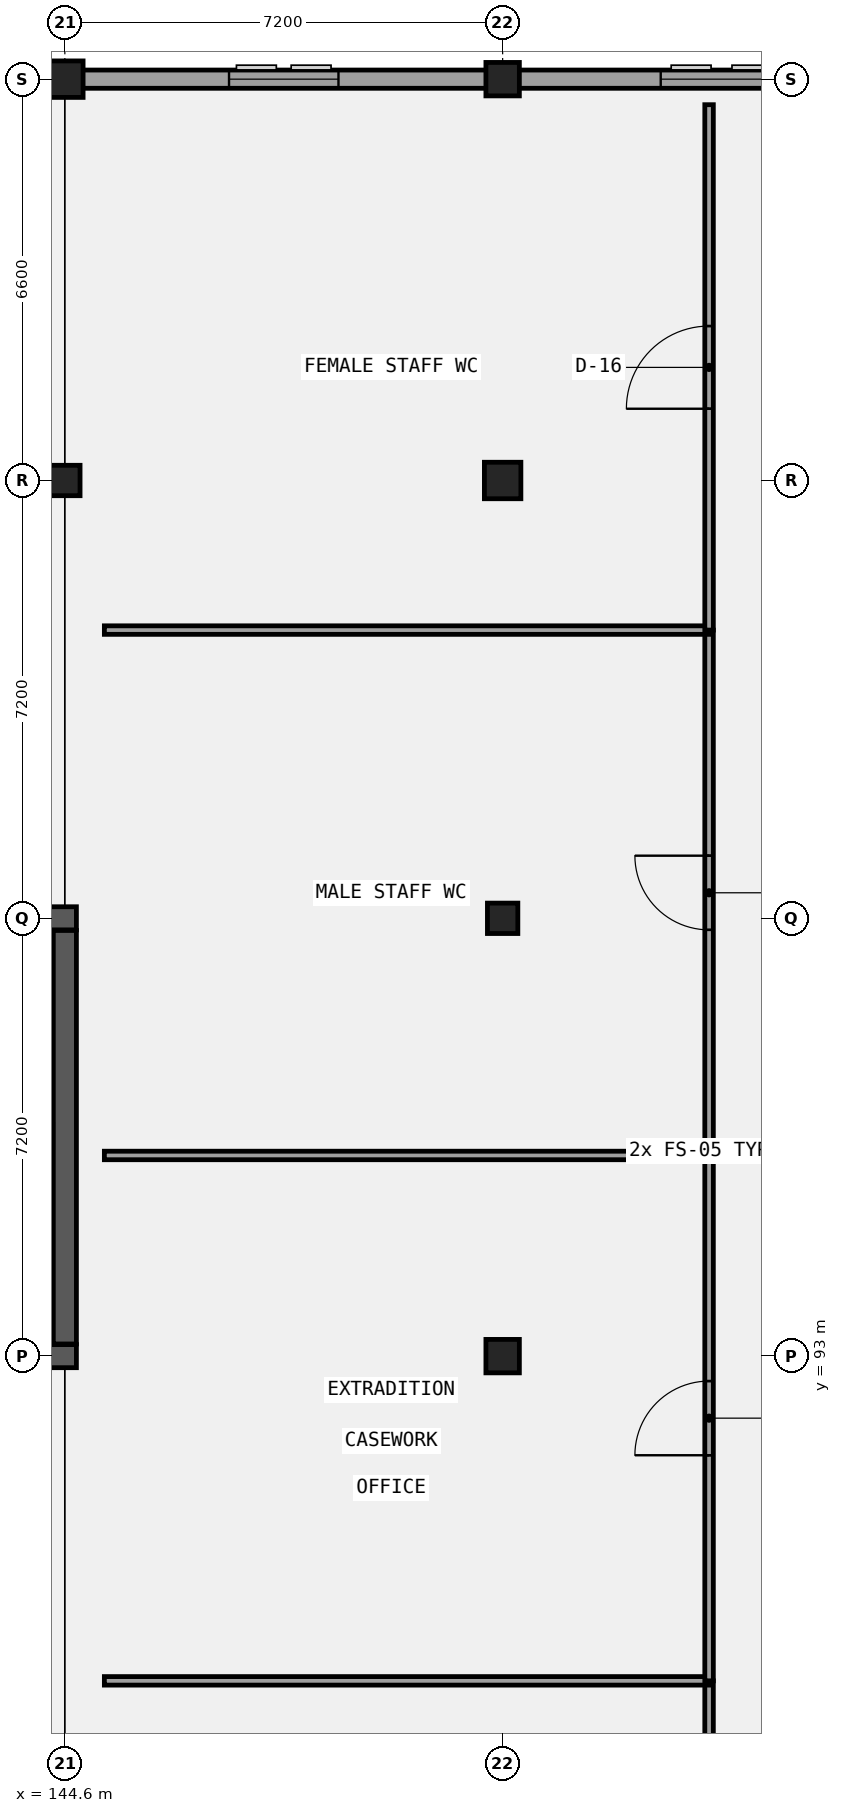
"""IFC4 building model, lengths in metres.
Left out: names, types, materials, properties, quantities, classifications, styles, units other than length and angle.
Written with IfcOpenShell. Run it as: python <this file> out.ifc"""

import sys

from ifc_helpers import new_model, si_unit, direction, frame, frame_2d, origin, origin_2d, place, context, subcontext, project, spatial, rectangle, extrude, element, fill, save


model = new_model("IFC4")
c1 = context("Model", 3, precision=1e-05, world=origin(), true_north=direction((0.0, 1.0)))
c2 = subcontext(c1, "Body", "Model", "MODEL_VIEW")
j1 = project(units=[si_unit("LENGTHUNIT", "METRE"), si_unit("PLANEANGLEUNIT", "RADIAN")], contexts=[c1])
p1 = place(None, origin())
s1 = spatial("IfcSite", under=j1, at=p1, CompositionType="ELEMENT")
p2 = place(p1, origin())
s2 = spatial("IfcBuilding", under=s1, at=p2, CompositionType="ELEMENT")
p3 = place(p2, frame((0.0, 0.0, 18.0)))
s3 = spatial("IfcBuildingStorey", under=s2, at=p3, CompositionType="ELEMENT", Elevation=18.0)
p4 = place(p3, frame((130.01, 100.2, 0.0), z_axis=(0.0, 0.0, 1.0), x_axis=(1.0, 0.0, 0.0)))
e1 = element("IfcWall", 1, at=p4, inside=s3, PredefinedType="SHEAR", context=c2, shape_type="SweptSolid", body=[
    extrude(rectangle(XDim=14.78, YDim=0.38, at=frame_2d((7.39, 0.0))), origin(), (0.0, 0.0, 1.0), 4.2),
])
p5 = place(p3, frame((130.01, 93.0, 0.0), z_axis=(0.0, 0.0, 1.0), x_axis=(1.0, 0.0, 0.0)))
e2 = element("IfcWall", 2, at=p5, inside=s3, PredefinedType="SHEAR", context=c2, shape_type="SweptSolid", body=[
    extrude(rectangle(XDim=14.78, YDim=0.38, at=frame_2d((7.39, 0.0))), origin(), (0.0, 0.0, 1.0), 4.2),
])
p6 = place(p5, frame((3.74, 0.0, 0.0)))
e3 = element("IfcOpeningElement", 3, at=p6, cuts=e2, PredefinedType="OPENING", context=c2, shape_type="SweptSolid", body=[
    extrude(rectangle(XDim=1.3, YDim=2.2, at=frame_2d((0.65, 1.1))), frame((0.0, 0.2, 0.0), z_axis=(0.0, -1.0, 0.0), x_axis=(1.0, 0.0, 0.0)), (0.0, 0.0, 1.0), 0.4),
])
p7 = place(p5, frame((11.74, 0.0, 0.0)))
e4 = element("IfcOpeningElement", 4, at=p7, cuts=e2, PredefinedType="OPENING", context=c2, shape_type="SweptSolid", body=[
    extrude(rectangle(XDim=1.3, YDim=2.2, at=frame_2d((0.65, 1.1))), frame((0.0, 0.2, 0.0), z_axis=(0.0, -1.0, 0.0), x_axis=(1.0, 0.0, 0.0)), (0.0, 0.0, 1.0), 0.4),
])
p8 = place(p3, frame((144.6, 93.2, 0.0), z_axis=(0.0, 0.0, 1.0), x_axis=(0.0, 1.0, 0.0)))
e5 = element("IfcWall", 5, at=p8, inside=s3, PredefinedType="SHEAR", context=c2, shape_type="SweptSolid", body=[
    extrude(rectangle(XDim=6.8, YDim=0.38, at=frame_2d((3.4, 0.0))), origin(), (0.0, 0.0, 1.0), 4.2),
])
p9 = place(p3, frame((130.4, 96.62, 0.0), z_axis=(0.0, 0.0, 1.0), x_axis=(1.0, 0.0, 0.0)))
e6 = element("IfcWall", 6, at=p9, inside=s3, PredefinedType="SHEAR", context=c2, shape_type="SweptSolid", body=[
    extrude(rectangle(XDim=14.0, YDim=0.38, at=frame_2d((7.0, 0.0))), origin(), (0.0, 0.0, 1.0), 4.2),
])
p10 = place(p9, frame((8.19, 0.0, 0.0)))
e7 = element("IfcOpeningElement", 7, at=p10, cuts=e6, PredefinedType="OPENING", context=c2, shape_type="SweptSolid", body=[
    extrude(rectangle(XDim=1.1, YDim=2.15, at=frame_2d((0.55, 1.075))), frame((0.0, 0.2, 0.0), z_axis=(0.0, -1.0, 0.0), x_axis=(1.0, 0.0, 0.0)), (0.0, 0.0, 1.0), 0.4),
])
p11 = place(p9, frame((10.11, 0.0, 0.0)))
e8 = element("IfcOpeningElement", 8, at=p11, cuts=e6, PredefinedType="OPENING", context=c2, shape_type="SweptSolid", body=[
    extrude(rectangle(XDim=1.1, YDim=2.15, at=frame_2d((0.55, 1.075))), frame((0.0, 0.2, 0.0), z_axis=(0.0, -1.0, 0.0), x_axis=(1.0, 0.0, 0.0)), (0.0, 0.0, 1.0), 0.4),
])
p12 = place(p9, frame((12.03, 0.0, 0.0)))
e9 = element("IfcOpeningElement", 9, at=p12, cuts=e6, PredefinedType="OPENING", context=c2, shape_type="SweptSolid", body=[
    extrude(rectangle(XDim=1.1, YDim=2.15, at=frame_2d((0.55, 1.075))), frame((0.0, 0.2, 0.0), z_axis=(0.0, -1.0, 0.0), x_axis=(1.0, 0.0, 0.0)), (0.0, 0.0, 1.0), 0.4),
])
p13 = place(p9, frame((0.375, 0.0, 0.0)))
e10 = element("IfcOpeningElement", 10, at=p13, cuts=e6, PredefinedType="OPENING", context=c2, shape_type="SweptSolid", body=[
    extrude(rectangle(XDim=1.15, YDim=2.15, at=frame_2d((0.575, 1.075))), frame((0.0, 0.2, 0.0), z_axis=(0.0, -1.0, 0.0), x_axis=(1.0, 0.0, 0.0)), (0.0, 0.0, 1.0), 0.4),
])
p14 = place(p3, frame((144.6, 107.4, 0.0), z_axis=(0.0, 0.0, 1.0), x_axis=(1.0, 0.0, 0.0)))
e11 = element("IfcColumn", 11, at=p14, inside=s3, PredefinedType="COLUMN", context=c2, shape_type="SweptSolid", body=[
    extrude(rectangle(XDim=0.5, YDim=0.5, at=origin_2d()), origin(), (0.0, 0.0, 1.0), 4.2),
])
p15 = place(p3, frame((144.6, 114.0, 0.0), z_axis=(0.0, 0.0, 1.0), x_axis=(1.0, 0.0, 0.0)))
e12 = element("IfcColumn", 12, at=p15, inside=s3, PredefinedType="COLUMN", context=c2, shape_type="SweptSolid", body=[
    extrude(rectangle(XDim=0.6, YDim=0.6, at=origin_2d()), origin(), (0.0, 0.0, 1.0), 4.2),
])
p16 = place(p3, frame((151.8, 93.0, 0.0), z_axis=(0.0, 0.0, 1.0), x_axis=(1.0, 0.0, 0.0)))
e13 = element("IfcColumn", 13, at=p16, inside=s3, PredefinedType="COLUMN", context=c2, shape_type="SweptSolid", body=[
    extrude(rectangle(XDim=0.55, YDim=0.55, at=origin_2d()), origin(), (0.0, 0.0, 1.0), 4.2),
])
p17 = place(p3, frame((151.8, 100.2, 0.0), z_axis=(0.0, 0.0, 1.0), x_axis=(1.0, 0.0, 0.0)))
e14 = element("IfcColumn", 14, at=p17, inside=s3, PredefinedType="COLUMN", context=c2, shape_type="SweptSolid", body=[
    extrude(rectangle(XDim=0.5, YDim=0.5, at=origin_2d()), origin(), (0.0, 0.0, 1.0), 4.2),
])
p18 = place(p3, frame((151.8, 107.4, 0.0), z_axis=(0.0, 0.0, 1.0), x_axis=(1.0, 0.0, 0.0)))
e15 = element("IfcColumn", 15, at=p18, inside=s3, PredefinedType="COLUMN", context=c2, shape_type="SweptSolid", body=[
    extrude(rectangle(XDim=0.6, YDim=0.6, at=origin_2d()), origin(), (0.0, 0.0, 1.0), 4.2),
])
p19 = place(p3, frame((151.8, 114.0, 0.0), z_axis=(0.0, 0.0, 1.0), x_axis=(1.0, 0.0, 0.0)))
e16 = element("IfcColumn", 16, at=p19, inside=s3, PredefinedType="COLUMN", context=c2, shape_type="SweptSolid", body=[
    extrude(rectangle(XDim=0.55, YDim=0.55, at=origin_2d()), origin(), (0.0, 0.0, 1.0), 4.2),
])
p20 = place(p3, frame((166.35, 114.0, 0.0), z_axis=(0.0, 0.0, 1.0), x_axis=(-1.0, 0.0, 0.0)))
e17 = element("IfcWall", 17, at=p20, inside=s3, PredefinedType="SOLIDWALL", context=c2, shape_type="SweptSolid", body=[
    extrude(rectangle(XDim=21.9, YDim=0.3, at=frame_2d((10.95, 0.0))), origin(), (0.0, 0.0, 1.0), 3.19),
])
p21 = place(p20, frame((17.25, 0.0, 0.95)))
e18 = element("IfcOpeningElement", 18, at=p21, cuts=e17, PredefinedType="OPENING", context=c2, shape_type="SweptSolid", body=[
    extrude(rectangle(XDim=1.8, YDim=1.9, at=frame_2d((0.9, 0.95))), frame((0.0, 0.16, 0.0), z_axis=(0.0, -1.0, 0.0), x_axis=(1.0, 0.0, 0.0)), (0.0, 0.0, 1.0), 0.32),
])
p22 = place(p20, frame((9.95, 0.0, 0.95)))
e19 = element("IfcOpeningElement", 19, at=p22, cuts=e17, PredefinedType="OPENING", context=c2, shape_type="SweptSolid", body=[
    extrude(rectangle(XDim=2.0, YDim=1.4, at=frame_2d((1.0, 0.7))), frame((0.0, 0.16, 0.0), z_axis=(0.0, -1.0, 0.0), x_axis=(1.0, 0.0, 0.0)), (0.0, 0.0, 1.0), 0.32),
])
p23 = place(p20, frame((2.75, 0.0, 0.95)))
e20 = element("IfcOpeningElement", 20, at=p23, cuts=e17, PredefinedType="OPENING", context=c2, shape_type="SweptSolid", body=[
    extrude(rectangle(XDim=2.0, YDim=1.65, at=frame_2d((1.0, 0.825))), frame((0.0, 0.16, 0.0), z_axis=(0.0, -1.0, 0.0), x_axis=(1.0, 0.0, 0.0)), (0.0, 0.0, 1.0), 0.32),
])
p24 = place(p3, frame((144.75, 114.0, 0.0), z_axis=(0.0, 0.0, 1.0), x_axis=(-1.0, 0.0, 0.0)))
e21 = element("IfcWall", 21, at=p24, inside=s3, PredefinedType="SOLIDWALL", context=c2, shape_type="SweptSolid", body=[
    extrude(rectangle(XDim=36.3, YDim=0.3, at=frame_2d((18.15, 0.0))), origin(), (0.0, 0.0, 1.0), 3.19),
])
p25 = place(p24, frame((31.65, 0.0, 0.95)))
e22 = element("IfcOpeningElement", 22, at=p25, cuts=e21, PredefinedType="OPENING", context=c2, shape_type="SweptSolid", body=[
    extrude(rectangle(XDim=1.8, YDim=1.9, at=frame_2d((0.9, 0.95))), frame((0.0, 0.16, 0.0), z_axis=(0.0, -1.0, 0.0), x_axis=(1.0, 0.0, 0.0)), (0.0, 0.0, 1.0), 0.32),
])
p26 = place(p24, frame((24.35, 0.0, 0.95)))
e23 = element("IfcOpeningElement", 23, at=p26, cuts=e21, PredefinedType="OPENING", context=c2, shape_type="SweptSolid", body=[
    extrude(rectangle(XDim=2.0, YDim=1.4, at=frame_2d((1.0, 0.7))), frame((0.0, 0.16, 0.0), z_axis=(0.0, -1.0, 0.0), x_axis=(1.0, 0.0, 0.0)), (0.0, 0.0, 1.0), 0.32),
])
p27 = place(p24, frame((17.15, 0.0, 0.95)))
e24 = element("IfcOpeningElement", 24, at=p27, cuts=e21, PredefinedType="OPENING", context=c2, shape_type="SweptSolid", body=[
    extrude(rectangle(XDim=2.0, YDim=1.65, at=frame_2d((1.0, 0.825))), frame((0.0, 0.16, 0.0), z_axis=(0.0, -1.0, 0.0), x_axis=(1.0, 0.0, 0.0)), (0.0, 0.0, 1.0), 0.32),
])
p28 = place(p24, frame((9.95, 0.0, 0.95)))
e25 = element("IfcOpeningElement", 25, at=p28, cuts=e21, PredefinedType="OPENING", context=c2, shape_type="SweptSolid", body=[
    extrude(rectangle(XDim=2.0, YDim=1.9, at=frame_2d((1.0, 0.95))), frame((0.0, 0.16, 0.0), z_axis=(0.0, -1.0, 0.0), x_axis=(1.0, 0.0, 0.0)), (0.0, 0.0, 1.0), 0.32),
])
p29 = place(p24, frame((2.65, 0.0, 0.95)))
e26 = element("IfcOpeningElement", 26, at=p29, cuts=e21, PredefinedType="OPENING", context=c2, shape_type="SweptSolid", body=[
    extrude(rectangle(XDim=2.2, YDim=1.4, at=frame_2d((1.1, 0.7))), frame((0.0, 0.16, 0.0), z_axis=(0.0, -1.0, 0.0), x_axis=(1.0, 0.0, 0.0)), (0.0, 0.0, 1.0), 0.32),
])
p30 = place(p3, frame((155.195, 79.02, 0.0), z_axis=(0.0, 0.0, 1.0), x_axis=(0.0, 1.0, 0.0)))
e27 = element("IfcWall", 27, at=p30, inside=s3, PredefinedType="PARTITIONING", context=c2, shape_type="SweptSolid", body=[
    extrude(rectangle(XDim=8.64, YDim=0.14, at=frame_2d((4.32, 0.0))), origin(), (0.0, 0.0, 1.0), 3.94),
])
p31 = place(p30, frame((3.71, 0.0, 0.0)))
e28 = element("IfcOpeningElement", 28, at=p31, cuts=e27, PredefinedType="OPENING", context=c2, shape_type="SweptSolid", body=[
    extrude(rectangle(XDim=1.22, YDim=2.1, at=frame_2d((0.61, 1.05))), frame((0.0, 0.08, 0.0), z_axis=(0.0, -1.0, 0.0), x_axis=(1.0, 0.0, 0.0)), (0.0, 0.0, 1.0), 0.16),
])
p32 = place(p3, frame((145.25, 87.66, 0.0), z_axis=(0.0, 0.0, 1.0), x_axis=(1.0, 0.0, 0.0)))
e29 = element("IfcWall", 29, at=p32, inside=s3, PredefinedType="PARTITIONING", context=c2, shape_type="SweptSolid", body=[
    extrude(rectangle(XDim=9.945, YDim=0.14, at=frame_2d((4.973, 0.0))), origin(), (0.0, 0.0, 1.0), 3.39),
])
p33 = place(p3, frame((155.195, 87.66, 0.0), z_axis=(0.0, 0.0, 1.0), x_axis=(0.0, 1.0, 0.0)))
e30 = element("IfcWall", 30, at=p33, inside=s3, PredefinedType="PARTITIONING", context=c2, shape_type="SweptSolid", body=[
    extrude(rectangle(XDim=8.64, YDim=0.14, at=frame_2d((4.32, 0.0))), origin(), (0.0, 0.0, 1.0), 3.94),
])
p34 = place(p33, frame((3.71, 0.0, 0.0)))
e31 = element("IfcOpeningElement", 31, at=p34, cuts=e30, PredefinedType="OPENING", context=c2, shape_type="SweptSolid", body=[
    extrude(rectangle(XDim=1.22, YDim=2.22, at=frame_2d((0.61, 1.11))), frame((0.0, 0.08, 0.0), z_axis=(0.0, -1.0, 0.0), x_axis=(1.0, 0.0, 0.0)), (0.0, 0.0, 1.0), 0.16),
])
p35 = place(p3, frame((145.25, 96.3, 0.0), z_axis=(0.0, 0.0, 1.0), x_axis=(1.0, 0.0, 0.0)))
e32 = element("IfcWall", 32, at=p35, inside=s3, PredefinedType="PARTITIONING", context=c2, shape_type="SweptSolid", body=[
    extrude(rectangle(XDim=9.945, YDim=0.14, at=frame_2d((4.973, 0.0))), origin(), (0.0, 0.0, 1.0), 3.94),
])
p36 = place(p3, frame((155.195, 96.3, 0.0), z_axis=(0.0, 0.0, 1.0), x_axis=(0.0, 1.0, 0.0)))
e33 = element("IfcWall", 33, at=p36, inside=s3, PredefinedType="PARTITIONING", context=c2, shape_type="SweptSolid", body=[
    extrude(rectangle(XDim=8.64, YDim=0.14, at=frame_2d((4.32, 0.0))), origin(), (0.0, 0.0, 1.0), 3.94),
])
p37 = place(p36, frame((3.71, 0.0, 0.0)))
e34 = element("IfcOpeningElement", 34, at=p37, cuts=e33, PredefinedType="OPENING", context=c2, shape_type="SweptSolid", body=[
    extrude(rectangle(XDim=1.22, YDim=2.35, at=frame_2d((0.61, 1.175))), frame((0.0, 0.08, 0.0), z_axis=(0.0, -1.0, 0.0), x_axis=(1.0, 0.0, 0.0)), (0.0, 0.0, 1.0), 0.16),
])
p38 = place(p3, frame((145.25, 104.94, 0.0), z_axis=(0.0, 0.0, 1.0), x_axis=(1.0, 0.0, 0.0)))
e35 = element("IfcWall", 35, at=p38, inside=s3, PredefinedType="PARTITIONING", context=c2, shape_type="SweptSolid", body=[
    extrude(rectangle(XDim=9.945, YDim=0.14, at=frame_2d((4.973, 0.0))), origin(), (0.0, 0.0, 1.0), 3.94),
])
p39 = place(p3, frame((155.195, 104.94, 0.0), z_axis=(0.0, 0.0, 1.0), x_axis=(0.0, 1.0, 0.0)))
e36 = element("IfcWall", 36, at=p39, inside=s3, PredefinedType="PARTITIONING", context=c2, shape_type="SweptSolid", body=[
    extrude(rectangle(XDim=8.64, YDim=0.14, at=frame_2d((4.32, 0.0))), origin(), (0.0, 0.0, 1.0), 3.94),
])
p40 = place(p39, frame((3.64, 0.0, 0.0)))
e37 = element("IfcOpeningElement", 37, at=p40, cuts=e36, PredefinedType="OPENING", context=c2, shape_type="SweptSolid", body=[
    extrude(rectangle(XDim=1.36, YDim=2.1, at=frame_2d((0.68, 1.05))), frame((0.0, 0.08, 0.0), z_axis=(0.0, -1.0, 0.0), x_axis=(1.0, 0.0, 0.0)), (0.0, 0.0, 1.0), 0.16),
])
p41 = place(p21, origin())
e38 = element("IfcWindow", 38, at=p41, inside=s3, PartitioningType="SINGLE_PANEL", PredefinedType="WINDOW", context=c2, shape_type="SweptSolid", body=[
    extrude(rectangle(XDim=1.8, YDim=1.9, at=frame_2d((0.9, 0.95))), frame((0.0, 0.03, 0.0), z_axis=(0.0, -1.0, 0.0), x_axis=(1.0, 0.0, 0.0)), (0.0, 0.0, 1.0), 0.06),
])
fill(e18, e38)
p42 = place(p22, origin())
e39 = element("IfcWindow", 39, at=p42, inside=s3, PartitioningType="SINGLE_PANEL", PredefinedType="WINDOW", context=c2, shape_type="SweptSolid", body=[
    extrude(rectangle(XDim=2.0, YDim=1.4, at=frame_2d((1.0, 0.7))), frame((0.0, 0.03, 0.0), z_axis=(0.0, -1.0, 0.0), x_axis=(1.0, 0.0, 0.0)), (0.0, 0.0, 1.0), 0.06),
])
fill(e19, e39)
p43 = place(p34, frame((1.22, 0.0, 0.0), z_axis=(0.0, 0.0, 1.0), x_axis=(-1.0, 0.0, 0.0)))
e40 = element("IfcDoor", 40, at=p43, inside=s3, OperationType="SINGLE_SWING_LEFT", PredefinedType="DOOR", context=c2, shape_type="SweptSolid", body=[
    extrude(rectangle(XDim=1.22, YDim=2.22, at=frame_2d((0.61, 1.11))), frame((0.0, 0.025, 0.0), z_axis=(0.0, -1.0, 0.0), x_axis=(1.0, 0.0, 0.0)), (0.0, 0.0, 1.0), 0.05),
])
fill(e31, e40)
p44 = place(p37, frame((1.22, 0.0, 0.0), z_axis=(0.0, 0.0, 1.0), x_axis=(-1.0, 0.0, 0.0)))
e41 = element("IfcDoor", 41, at=p44, inside=s3, OperationType="SINGLE_SWING_RIGHT", PredefinedType="DOOR", context=c2, shape_type="SweptSolid", body=[
    extrude(rectangle(XDim=1.22, YDim=2.35, at=frame_2d((0.61, 1.175))), frame((0.0, 0.025, 0.0), z_axis=(0.0, -1.0, 0.0), x_axis=(1.0, 0.0, 0.0)), (0.0, 0.0, 1.0), 0.05),
])
fill(e34, e41)
p45 = place(p40, frame((1.36, 0.0, 0.0), z_axis=(0.0, 0.0, 1.0), x_axis=(-1.0, 0.0, 0.0)))
e42 = element("IfcDoor", 42, at=p45, inside=s3, OperationType="SINGLE_SWING_LEFT", PredefinedType="DOOR", context=c2, shape_type="SweptSolid", body=[
    extrude(rectangle(XDim=1.36, YDim=2.1, at=frame_2d((0.68, 1.05))), frame((0.0, 0.025, 0.0), z_axis=(0.0, -1.0, 0.0), x_axis=(1.0, 0.0, 0.0)), (0.0, 0.0, 1.0), 0.05),
])
fill(e37, e42)
save(model, sys.argv[1])
